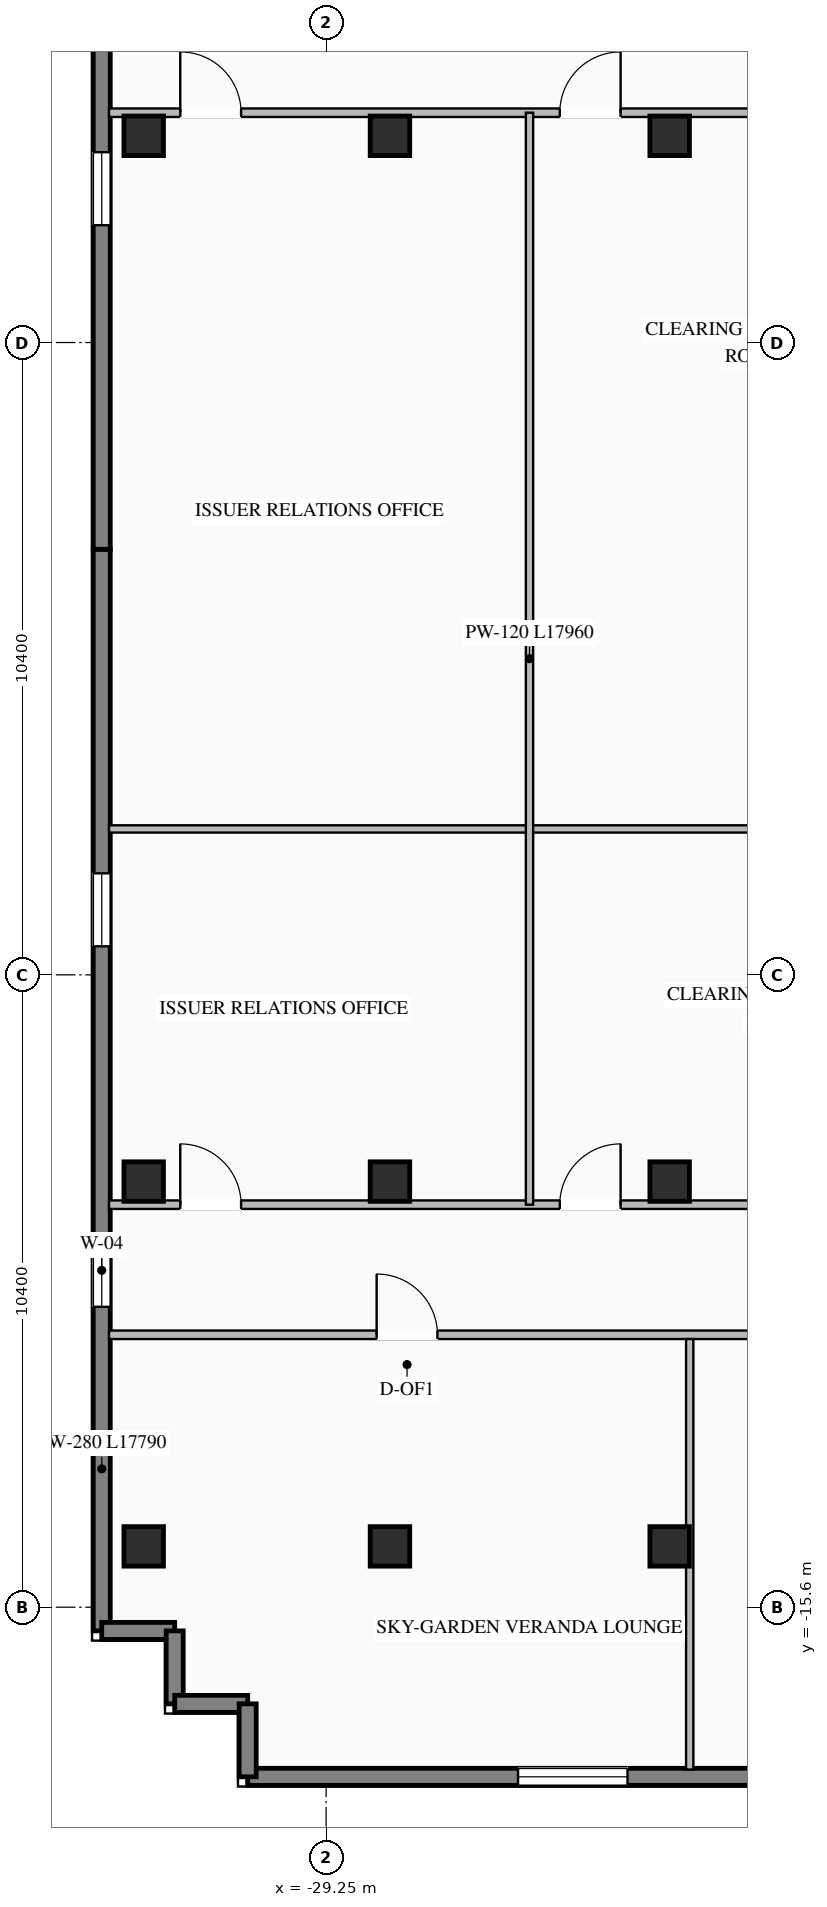
"""IFC4 building model, lengths in metres.
Left out: names, types, materials, properties, quantities, classifications, styles, units other than length and angle.
Written with IfcOpenShell. Run it as: python <this file> out.ifc"""

import sys

from ifc_helpers import new_model, si_unit, direction, frame, frame_2d, origin, origin_2d, place, context, subcontext, project, spatial, rectangle, i_section, extrude, element, fill, save


model = new_model("IFC4")
c1 = context("Model", 3, precision=1e-05, world=origin(), true_north=direction((0.0, 1.0)))
c2 = subcontext(c1, "Body", "Model", "MODEL_VIEW")
j1 = project(units=[si_unit("LENGTHUNIT", "METRE"), si_unit("PLANEANGLEUNIT", "RADIAN")], contexts=[c1])
p1 = place(None, origin())
s1 = spatial("IfcSite", under=j1, at=p1, CompositionType="ELEMENT")
p2 = place(p1, origin())
s2 = spatial("IfcBuilding", under=s1, at=p2, CompositionType="ELEMENT")
p3 = place(p2, frame((0.0, 0.0, 131.2)))
s3 = spatial("IfcBuildingStorey", under=s2, at=p3, CompositionType="ELEMENT", Elevation=131.2)
for number, where, z_axis, x_axis in (
    (1, (-23.6, -14.6, 0.0), (0.0, 0.0, 1.0), (1.0, 0.0, 0.0)),
    (2, (-23.6, -8.6, 0.0), (0.0, 0.0, 1.0), (1.0, 0.0, 0.0)),
    (3, (-23.6, 8.6, 0.0), (0.0, 0.0, 1.0), (1.0, 0.0, 0.0)),
    (4, (-28.2, -14.6, 0.0), (0.0, 0.0, 1.0), (1.0, 0.0, 0.0)),
    (5, (-28.2, -8.6, 0.0), (0.0, 0.0, 1.0), (1.0, 0.0, 0.0)),
    (6, (-28.2, 8.6, 0.0), (0.0, 0.0, 1.0), (1.0, 0.0, 0.0)),
    (7, (-32.25, -14.6, 0.0), (0.0, 0.0, 1.0), (1.0, 0.0, 0.0)),
    (8, (-32.25, -8.6, 0.0), (0.0, 0.0, 1.0), (1.0, 0.0, 0.0)),
    (9, (-32.25, 8.6, 0.0), (0.0, 0.0, 1.0), (1.0, 0.0, 0.0)),
):
    element("IfcColumn", number, at=place(p3, frame(where, z_axis=z_axis, x_axis=x_axis)), inside=s3, PredefinedType="COLUMN", context=c2, shape_type="SweptSolid", body=[
        extrude(i_section(OverallWidth=0.65, OverallDepth=0.65, WebThickness=0.028, FlangeThickness=0.04, at=origin_2d()), origin(), (0.0, 0.0, 1.0), 3.45),
    ])
p4 = place(p3, frame((-14.5, -18.39, 0.0), z_axis=(0.0, 0.0, 1.0), x_axis=(-1.0, 0.0, 0.0)))
e10 = element("IfcWall", 10, at=p4, inside=s3, PredefinedType="STANDARD", context=c2, shape_type="SweptSolid", body=[
    extrude(rectangle(XDim=16.04, YDim=0.28, at=frame_2d((8.02, 0.0))), origin(), (0.0, 0.0, 1.0), 3.25),
])
p5 = place(p4, frame((4.447, 0.0, 0.76)))
e11 = element("IfcOpeningElement", 11, at=p5, cuts=e10, PredefinedType="OPENING", context=c2, shape_type="SweptSolid", body=[
    extrude(rectangle(XDim=1.8, YDim=1.95, at=frame_2d((0.9, 0.975))), frame((0.0, 0.15, 0.0), z_axis=(0.0, -1.0, 0.0), x_axis=(1.0, 0.0, 0.0)), (0.0, 0.0, 1.0), 0.3),
])
p6 = place(p4, frame((9.793, 0.0, 0.76)))
e12 = element("IfcOpeningElement", 12, at=p6, cuts=e10, PredefinedType="OPENING", context=c2, shape_type="SweptSolid", body=[
    extrude(rectangle(XDim=1.8, YDim=1.95, at=frame_2d((0.9, 0.975))), frame((0.0, 0.15, 0.0), z_axis=(0.0, -1.0, 0.0), x_axis=(1.0, 0.0, 0.0)), (0.0, 0.0, 1.0), 0.3),
])
p7 = place(p3, frame((-32.94, -15.99, 0.0), z_axis=(0.0, 0.0, 1.0), x_axis=(0.0, 1.0, 0.0)))
e13 = element("IfcWall", 13, at=p7, inside=s3, PredefinedType="STANDARD", context=c2, shape_type="SweptSolid", body=[
    extrude(rectangle(XDim=17.79, YDim=0.28, at=frame_2d((8.895, 0.0))), origin(), (0.0, 0.0, 1.0), 3.25),
])
p8 = place(p7, frame((5.33, 0.0, 0.76)))
e14 = element("IfcOpeningElement", 14, at=p8, cuts=e13, PredefinedType="OPENING", context=c2, shape_type="SweptSolid", body=[
    extrude(rectangle(XDim=1.2, YDim=1.95, at=frame_2d((0.6, 0.975))), frame((0.0, 0.15, 0.0), z_axis=(0.0, -1.0, 0.0), x_axis=(1.0, 0.0, 0.0)), (0.0, 0.0, 1.0), 0.3),
])
p9 = place(p7, frame((11.26, 0.0, 0.76)))
e15 = element("IfcOpeningElement", 15, at=p9, cuts=e13, PredefinedType="OPENING", context=c2, shape_type="SweptSolid", body=[
    extrude(rectangle(XDim=1.2, YDim=1.95, at=frame_2d((0.6, 0.975))), frame((0.0, 0.15, 0.0), z_axis=(0.0, -1.0, 0.0), x_axis=(1.0, 0.0, 0.0)), (0.0, 0.0, 1.0), 0.3),
])
p10 = place(p3, frame((-32.94, 1.8, 0.0), z_axis=(0.0, 0.0, 1.0), x_axis=(0.0, 1.0, 0.0)))
e16 = element("IfcWall", 16, at=p10, inside=s3, PredefinedType="STANDARD", context=c2, shape_type="SweptSolid", body=[
    extrude(rectangle(XDim=17.79, YDim=0.28, at=frame_2d((8.895, 0.0))), origin(), (0.0, 0.0, 1.0), 3.25),
])
p11 = place(p10, frame((5.33, 0.0, 0.76)))
e17 = element("IfcOpeningElement", 17, at=p11, cuts=e16, PredefinedType="OPENING", context=c2, shape_type="SweptSolid", body=[
    extrude(rectangle(XDim=1.2, YDim=1.95, at=frame_2d((0.6, 0.975))), frame((0.0, 0.15, 0.0), z_axis=(0.0, -1.0, 0.0), x_axis=(1.0, 0.0, 0.0)), (0.0, 0.0, 1.0), 0.3),
])
p12 = place(p10, frame((11.26, 0.0, 0.76)))
e18 = element("IfcOpeningElement", 18, at=p12, cuts=e16, PredefinedType="OPENING", context=c2, shape_type="SweptSolid", body=[
    extrude(rectangle(XDim=1.2, YDim=1.95, at=frame_2d((0.6, 0.975))), frame((0.0, 0.15, 0.0), z_axis=(0.0, -1.0, 0.0), x_axis=(1.0, 0.0, 0.0)), (0.0, 0.0, 1.0), 0.3),
])
for number, where, z_axis, x_axis in (
    (19, (-32.94, -15.99, 0.0), (0.0, 0.0, 1.0), (1.0, 0.0, 0.0)),
    (20, (-31.74, -15.99, 0.0), (0.0, 0.0, 1.0), (0.0, -1.0, 0.0)),
    (21, (-31.74, -17.19, 0.0), (0.0, 0.0, 1.0), (1.0, 0.0, 0.0)),
    (22, (-30.54, -17.19, 0.0), (0.0, 0.0, 1.0), (0.0, -1.0, 0.0)),
):
    element("IfcWall", number, at=place(p3, frame(where, z_axis=z_axis, x_axis=x_axis)), inside=s3, PredefinedType="STANDARD", context=c2, shape_type="SweptSolid", body=[
        extrude(rectangle(XDim=1.2, YDim=0.28, at=frame_2d((0.6, 0.0))), origin(), (0.0, 0.0, 1.0), 3.25),
    ])
p13 = place(p3, frame((-32.82, -11.12, 0.0), z_axis=(0.0, 0.0, 1.0), x_axis=(1.0, 0.0, 0.0)))
e23 = element("IfcWall", 23, at=p13, inside=s3, PredefinedType="STANDARD", context=c2, shape_type="SweptSolid", body=[
    extrude(rectangle(XDim=63.64, YDim=0.14, at=frame_2d((31.82, 0.0))), origin(), (0.0, 0.0, 1.0), 3.25),
])
p14 = place(p13, frame((39.31, 0.0, 0.0)))
e24 = element("IfcOpeningElement", 24, at=p14, cuts=e23, PredefinedType="OPENING", context=c2, shape_type="SweptSolid", body=[
    extrude(rectangle(XDim=0.92, YDim=2.08, at=frame_2d((0.46, 1.04))), frame((0.0, 0.08, 0.0), z_axis=(0.0, -1.0, 0.0), x_axis=(1.0, 0.0, 0.0)), (0.0, 0.0, 1.0), 0.16),
])
p15 = place(p13, frame((42.81, 0.0, 0.0)))
e25 = element("IfcOpeningElement", 25, at=p15, cuts=e23, PredefinedType="OPENING", context=c2, shape_type="SweptSolid", body=[
    extrude(rectangle(XDim=0.92, YDim=2.08, at=frame_2d((0.46, 1.04))), frame((0.0, 0.08, 0.0), z_axis=(0.0, -1.0, 0.0), x_axis=(1.0, 0.0, 0.0)), (0.0, 0.0, 1.0), 0.16),
])
p16 = place(p13, frame((45.66, 0.0, 0.0)))
e26 = element("IfcOpeningElement", 26, at=p16, cuts=e23, PredefinedType="OPENING", context=c2, shape_type="SweptSolid", body=[
    extrude(rectangle(XDim=0.92, YDim=2.08, at=frame_2d((0.46, 1.04))), frame((0.0, 0.08, 0.0), z_axis=(0.0, -1.0, 0.0), x_axis=(1.0, 0.0, 0.0)), (0.0, 0.0, 1.0), 0.16),
])
p17 = place(p13, frame((4.401, 0.0, 0.0)))
e27 = element("IfcOpeningElement", 27, at=p17, cuts=e23, PredefinedType="OPENING", context=c2, shape_type="SweptSolid", body=[
    extrude(rectangle(XDim=1.0, YDim=2.08, at=frame_2d((0.5, 1.04))), frame((0.0, 0.08, 0.0), z_axis=(0.0, -1.0, 0.0), x_axis=(1.0, 0.0, 0.0)), (0.0, 0.0, 1.0), 0.16),
])
p18 = place(p13, frame((14.175, 0.0, 0.0)))
e28 = element("IfcOpeningElement", 28, at=p18, cuts=e23, PredefinedType="OPENING", context=c2, shape_type="SweptSolid", body=[
    extrude(rectangle(XDim=1.0, YDim=2.08, at=frame_2d((0.5, 1.04))), frame((0.0, 0.08, 0.0), z_axis=(0.0, -1.0, 0.0), x_axis=(1.0, 0.0, 0.0)), (0.0, 0.0, 1.0), 0.16),
])
p19 = place(p13, frame((24.234, 0.0, 0.0)))
e29 = element("IfcOpeningElement", 29, at=p19, cuts=e23, PredefinedType="OPENING", context=c2, shape_type="SweptSolid", body=[
    extrude(rectangle(XDim=1.0, YDim=2.08, at=frame_2d((0.5, 1.04))), frame((0.0, 0.08, 0.0), z_axis=(0.0, -1.0, 0.0), x_axis=(1.0, 0.0, 0.0)), (0.0, 0.0, 1.0), 0.16),
])
p20 = place(p13, frame((33.344, 0.0, 0.0)))
e30 = element("IfcOpeningElement", 30, at=p20, cuts=e23, PredefinedType="OPENING", context=c2, shape_type="SweptSolid", body=[
    extrude(rectangle(XDim=1.0, YDim=2.08, at=frame_2d((0.5, 1.04))), frame((0.0, 0.08, 0.0), z_axis=(0.0, -1.0, 0.0), x_axis=(1.0, 0.0, 0.0)), (0.0, 0.0, 1.0), 0.16),
])
p21 = place(p13, frame((48.765, 0.0, 0.0)))
e31 = element("IfcOpeningElement", 31, at=p21, cuts=e23, PredefinedType="OPENING", context=c2, shape_type="SweptSolid", body=[
    extrude(rectangle(XDim=1.0, YDim=2.08, at=frame_2d((0.5, 1.04))), frame((0.0, 0.08, 0.0), z_axis=(0.0, -1.0, 0.0), x_axis=(1.0, 0.0, 0.0)), (0.0, 0.0, 1.0), 0.16),
])
p22 = place(p13, frame((53.019, 0.0, 0.0)))
e32 = element("IfcOpeningElement", 32, at=p22, cuts=e23, PredefinedType="OPENING", context=c2, shape_type="SweptSolid", body=[
    extrude(rectangle(XDim=1.0, YDim=2.08, at=frame_2d((0.5, 1.04))), frame((0.0, 0.08, 0.0), z_axis=(0.0, -1.0, 0.0), x_axis=(1.0, 0.0, 0.0)), (0.0, 0.0, 1.0), 0.16),
])
p23 = place(p13, frame((57.354, 0.0, 0.0)))
e33 = element("IfcOpeningElement", 33, at=p23, cuts=e23, PredefinedType="OPENING", context=c2, shape_type="SweptSolid", body=[
    extrude(rectangle(XDim=1.0, YDim=2.08, at=frame_2d((0.5, 1.04))), frame((0.0, 0.08, 0.0), z_axis=(0.0, -1.0, 0.0), x_axis=(1.0, 0.0, 0.0)), (0.0, 0.0, 1.0), 0.16),
])
p24 = place(p13, frame((61.185, 0.0, 0.0)))
e34 = element("IfcOpeningElement", 34, at=p24, cuts=e23, PredefinedType="OPENING", context=c2, shape_type="SweptSolid", body=[
    extrude(rectangle(XDim=1.0, YDim=2.08, at=frame_2d((0.5, 1.04))), frame((0.0, 0.08, 0.0), z_axis=(0.0, -1.0, 0.0), x_axis=(1.0, 0.0, 0.0)), (0.0, 0.0, 1.0), 0.16),
])
p25 = place(p3, frame((-23.27, -18.27, 0.0), z_axis=(0.0, 0.0, 1.0), x_axis=(0.0, 1.0, 0.0)))
e35 = element("IfcWall", 35, at=p25, inside=s3, PredefinedType="STANDARD", context=c2, shape_type="SweptSolid", body=[
    extrude(rectangle(XDim=7.08, YDim=0.12, at=frame_2d((3.54, 0.0))), origin(), (0.0, 0.0, 1.0), 3.25),
])
p26 = place(p3, frame((-32.82, 8.98, 0.0), z_axis=(0.0, 0.0, 1.0), x_axis=(1.0, 0.0, 0.0)))
e36 = element("IfcWall", 36, at=p26, inside=s3, PredefinedType="STANDARD", context=c2, shape_type="SweptSolid", body=[
    extrude(rectangle(XDim=13.77, YDim=0.14, at=frame_2d((6.885, 0.0))), origin(), (0.0, 0.0, 1.0), 3.25),
])
p27 = place(p26, frame((1.171, 0.0, 0.0)))
e37 = element("IfcOpeningElement", 37, at=p27, cuts=e36, PredefinedType="OPENING", context=c2, shape_type="SweptSolid", body=[
    extrude(rectangle(XDim=1.0, YDim=2.08, at=frame_2d((0.5, 1.04))), frame((0.0, 0.08, 0.0), z_axis=(0.0, -1.0, 0.0), x_axis=(1.0, 0.0, 0.0)), (0.0, 0.0, 1.0), 0.16),
])
p28 = place(p26, frame((7.413, 0.0, 0.0)))
e38 = element("IfcOpeningElement", 38, at=p28, cuts=e36, PredefinedType="OPENING", context=c2, shape_type="SweptSolid", body=[
    extrude(rectangle(XDim=1.0, YDim=2.08, at=frame_2d((0.5, 1.04))), frame((0.0, 0.08, 0.0), z_axis=(0.0, -1.0, 0.0), x_axis=(1.0, 0.0, 0.0)), (0.0, 0.0, 1.0), 0.16),
])
p29 = place(p3, frame((-32.82, -8.98, 0.0), z_axis=(0.0, 0.0, 1.0), x_axis=(1.0, 0.0, 0.0)))
e39 = element("IfcWall", 39, at=p29, inside=s3, PredefinedType="STANDARD", context=c2, shape_type="SweptSolid", body=[
    extrude(rectangle(XDim=13.77, YDim=0.14, at=frame_2d((6.885, 0.0))), origin(), (0.0, 0.0, 1.0), 3.25),
])
p30 = place(p29, frame((1.171, 0.0, 0.0)))
e40 = element("IfcOpeningElement", 40, at=p30, cuts=e39, PredefinedType="OPENING", context=c2, shape_type="SweptSolid", body=[
    extrude(rectangle(XDim=1.0, YDim=2.08, at=frame_2d((0.5, 1.04))), frame((0.0, 0.08, 0.0), z_axis=(0.0, -1.0, 0.0), x_axis=(1.0, 0.0, 0.0)), (0.0, 0.0, 1.0), 0.16),
])
p31 = place(p29, frame((7.413, 0.0, 0.0)))
e41 = element("IfcOpeningElement", 41, at=p31, cuts=e39, PredefinedType="OPENING", context=c2, shape_type="SweptSolid", body=[
    extrude(rectangle(XDim=1.0, YDim=2.08, at=frame_2d((0.5, 1.04))), frame((0.0, 0.08, 0.0), z_axis=(0.0, -1.0, 0.0), x_axis=(1.0, 0.0, 0.0)), (0.0, 0.0, 1.0), 0.16),
])
p32 = place(p3, frame((-32.82, -2.8, 0.0), z_axis=(0.0, 0.0, 1.0), x_axis=(1.0, 0.0, 0.0)))
e42 = element("IfcWall", 42, at=p32, inside=s3, PredefinedType="STANDARD", context=c2, shape_type="SweptSolid", body=[
    extrude(rectangle(XDim=13.77, YDim=0.12, at=frame_2d((6.885, 0.0))), origin(), (0.0, 0.0, 1.0), 3.25),
])
p33 = place(p3, frame((-25.905, -8.98, 0.0), z_axis=(0.0, 0.0, 1.0), x_axis=(0.0, 1.0, 0.0)))
e43 = element("IfcWall", 43, at=p33, inside=s3, PredefinedType="STANDARD", context=c2, shape_type="SweptSolid", body=[
    extrude(rectangle(XDim=17.96, YDim=0.12, at=frame_2d((8.98, 0.0))), origin(), (0.0, 0.0, 1.0), 3.25),
])
p34 = place(p6, origin())
e44 = element("IfcWindow", 44, at=p34, inside=s3, PartitioningType="SINGLE_PANEL", PredefinedType="WINDOW", context=c2, shape_type="SweptSolid", body=[
    extrude(rectangle(XDim=1.8, YDim=1.95, at=frame_2d((0.9, 0.975))), frame((0.0, 0.03, 0.0), z_axis=(0.0, -1.0, 0.0), x_axis=(1.0, 0.0, 0.0)), (0.0, 0.0, 1.0), 0.06),
])
fill(e12, e44)
p35 = place(p8, origin())
e45 = element("IfcWindow", 45, at=p35, inside=s3, PartitioningType="SINGLE_PANEL", PredefinedType="WINDOW", context=c2, shape_type="SweptSolid", body=[
    extrude(rectangle(XDim=1.2, YDim=1.95, at=frame_2d((0.6, 0.975))), frame((0.0, 0.03, 0.0), z_axis=(0.0, -1.0, 0.0), x_axis=(1.0, 0.0, 0.0)), (0.0, 0.0, 1.0), 0.06),
])
fill(e14, e45)
p36 = place(p9, origin())
e46 = element("IfcWindow", 46, at=p36, inside=s3, PartitioningType="SINGLE_PANEL", PredefinedType="WINDOW", context=c2, shape_type="SweptSolid", body=[
    extrude(rectangle(XDim=1.2, YDim=1.95, at=frame_2d((0.6, 0.975))), frame((0.0, 0.03, 0.0), z_axis=(0.0, -1.0, 0.0), x_axis=(1.0, 0.0, 0.0)), (0.0, 0.0, 1.0), 0.06),
])
fill(e15, e46)
p37 = place(p11, origin())
e47 = element("IfcWindow", 47, at=p37, inside=s3, PartitioningType="SINGLE_PANEL", PredefinedType="WINDOW", context=c2, shape_type="SweptSolid", body=[
    extrude(rectangle(XDim=1.2, YDim=1.95, at=frame_2d((0.6, 0.975))), frame((0.0, 0.03, 0.0), z_axis=(0.0, -1.0, 0.0), x_axis=(1.0, 0.0, 0.0)), (0.0, 0.0, 1.0), 0.06),
])
fill(e17, e47)
p38 = place(p17, origin())
e48 = element("IfcDoor", 48, at=p38, inside=s3, OperationType="SINGLE_SWING_LEFT", PredefinedType="DOOR", context=c2, shape_type="SweptSolid", body=[
    extrude(rectangle(XDim=1.0, YDim=2.08, at=frame_2d((0.5, 1.04))), frame((0.0, 0.025, 0.0), z_axis=(0.0, -1.0, 0.0), x_axis=(1.0, 0.0, 0.0)), (0.0, 0.0, 1.0), 0.05),
])
fill(e27, e48)
p39 = place(p27, origin())
e49 = element("IfcDoor", 49, at=p39, inside=s3, OperationType="SINGLE_SWING_LEFT", PredefinedType="DOOR", context=c2, shape_type="SweptSolid", body=[
    extrude(rectangle(XDim=1.0, YDim=2.08, at=frame_2d((0.5, 1.04))), frame((0.0, 0.025, 0.0), z_axis=(0.0, -1.0, 0.0), x_axis=(1.0, 0.0, 0.0)), (0.0, 0.0, 1.0), 0.05),
])
fill(e37, e49)
p40 = place(p28, origin())
e50 = element("IfcDoor", 50, at=p40, inside=s3, OperationType="SINGLE_SWING_RIGHT", PredefinedType="DOOR", context=c2, shape_type="SweptSolid", body=[
    extrude(rectangle(XDim=1.0, YDim=2.08, at=frame_2d((0.5, 1.04))), frame((0.0, 0.025, 0.0), z_axis=(0.0, -1.0, 0.0), x_axis=(1.0, 0.0, 0.0)), (0.0, 0.0, 1.0), 0.05),
])
fill(e38, e50)
p41 = place(p30, origin())
e51 = element("IfcDoor", 51, at=p41, inside=s3, OperationType="SINGLE_SWING_LEFT", PredefinedType="DOOR", context=c2, shape_type="SweptSolid", body=[
    extrude(rectangle(XDim=1.0, YDim=2.08, at=frame_2d((0.5, 1.04))), frame((0.0, 0.025, 0.0), z_axis=(0.0, -1.0, 0.0), x_axis=(1.0, 0.0, 0.0)), (0.0, 0.0, 1.0), 0.05),
])
fill(e40, e51)
p42 = place(p31, origin())
e52 = element("IfcDoor", 52, at=p42, inside=s3, OperationType="SINGLE_SWING_RIGHT", PredefinedType="DOOR", context=c2, shape_type="SweptSolid", body=[
    extrude(rectangle(XDim=1.0, YDim=2.08, at=frame_2d((0.5, 1.04))), frame((0.0, 0.025, 0.0), z_axis=(0.0, -1.0, 0.0), x_axis=(1.0, 0.0, 0.0)), (0.0, 0.0, 1.0), 0.05),
])
fill(e41, e52)
save(model, sys.argv[1])
